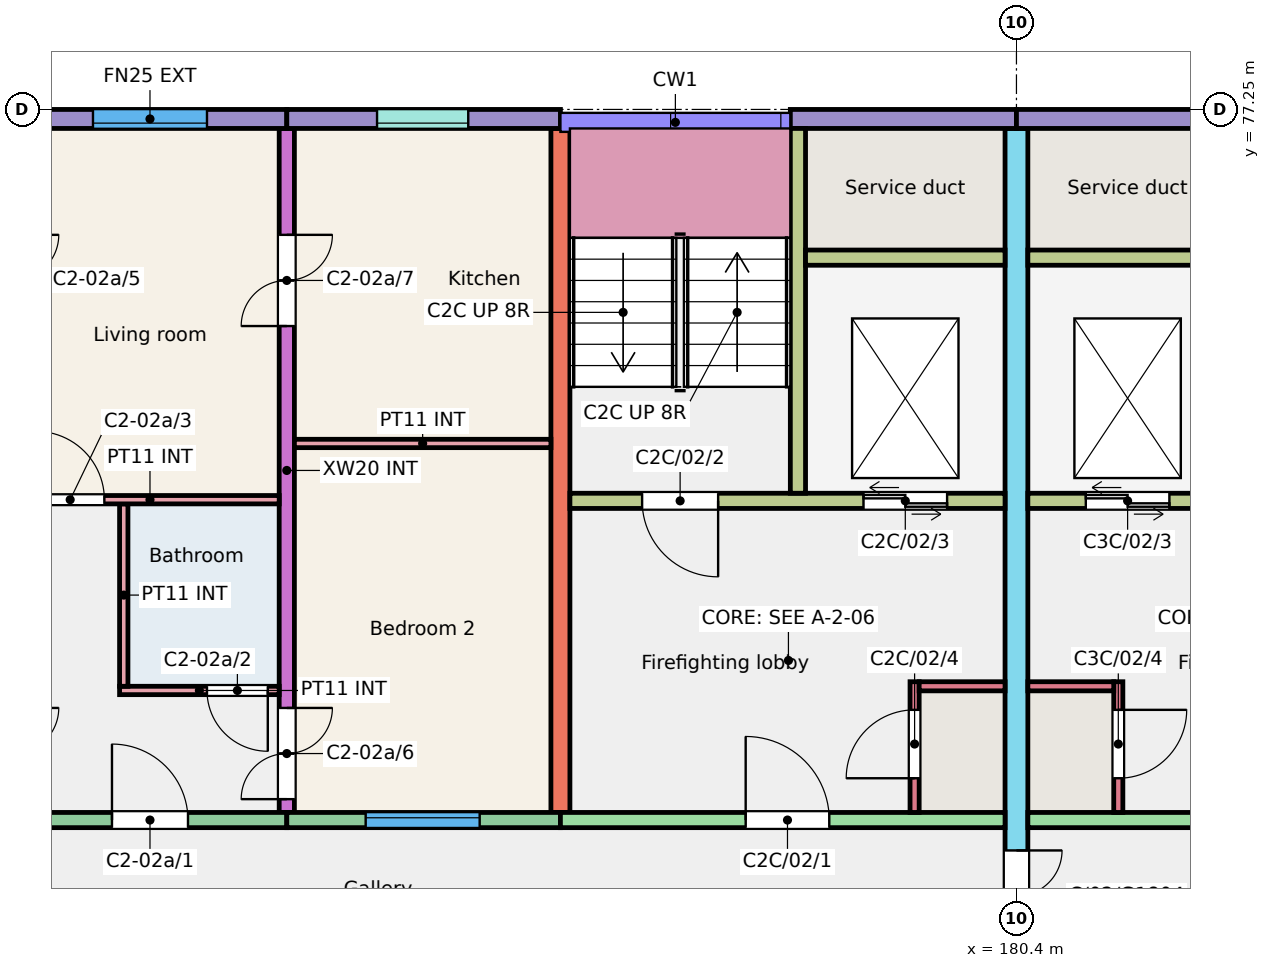
"""IFC4 building model, lengths in metres.
Left out: names, types, materials, properties, quantities, classifications, styles, units other than length and angle.
Written with IfcOpenShell. Run it as: python <this file> out.ifc"""

import sys

from ifc_helpers import new_model, si_unit, direction, frame, frame_2d, origin, place, context, subcontext, project, spatial, rectangle, extrude, element, fill, save


model = new_model("IFC4")
c1 = context("Model", 3, precision=1e-05, world=origin(), true_north=direction((0.0, 1.0)))
c2 = subcontext(c1, "Body", "Model", "MODEL_VIEW")
j1 = project(units=[si_unit("LENGTHUNIT", "METRE"), si_unit("PLANEANGLEUNIT", "RADIAN")], contexts=[c1])
p1 = place(None, origin())
s1 = spatial("IfcSite", under=j1, at=p1, CompositionType="ELEMENT")
p2 = place(p1, origin())
s2 = spatial("IfcBuilding", under=s1, at=p2, CompositionType="ELEMENT")
p3 = place(p2, frame((0.0, 0.0, 6.0)))
s3 = spatial("IfcBuildingStorey", under=s2, at=p3, CompositionType="ELEMENT", Elevation=6.0)
p4 = place(p3, frame((170.8, 68.0, 0.0), z_axis=(0.0, 0.0, 1.0), x_axis=(0.0, 1.0, 0.0)))
e1 = element("IfcWall", 1, at=p4, inside=s3, PredefinedType="SHEAR", context=c2, shape_type="SweptSolid", body=[
    extrude(rectangle(XDim=9.0, YDim=0.2, at=frame_2d((4.5, 0.0))), origin(), (0.0, 0.0, 1.0), 3.0),
])
p5 = place(p4, frame((0.175, 0.0, 0.0)))
e2 = element("IfcOpeningElement", 2, at=p5, cuts=e1, PredefinedType="OPENING", context=c2, shape_type="SweptSolid", body=[
    extrude(rectangle(XDim=1.2, YDim=2.1, at=frame_2d((0.6, 1.05))), frame((0.0, 0.11, 0.0), z_axis=(0.0, -1.0, 0.0), x_axis=(1.0, 0.0, 0.0)), (0.0, 0.0, 1.0), 0.22),
])
p6 = place(p4, frame((6.4, 0.0, 0.0)))
e3 = element("IfcOpeningElement", 3, at=p6, cuts=e1, PredefinedType="OPENING", context=c2, shape_type="SweptSolid", body=[
    extrude(rectangle(XDim=1.2, YDim=2.1, at=frame_2d((0.6, 1.05))), frame((0.0, 0.11, 0.0), z_axis=(0.0, -1.0, 0.0), x_axis=(1.0, 0.0, 0.0)), (0.0, 0.0, 1.0), 0.22),
])
p7 = place(p3, frame((174.4, 68.0, 0.0), z_axis=(0.0, 0.0, 1.0), x_axis=(0.0, 1.0, 0.0)))
e4 = element("IfcWall", 4, at=p7, inside=s3, PredefinedType="SHEAR", context=c2, shape_type="SweptSolid", body=[
    extrude(rectangle(XDim=9.0, YDim=0.25, at=frame_2d((4.5, 0.0))), origin(), (0.0, 0.0, 1.0), 3.0),
])
p8 = place(p3, frame((180.4, 66.0, 0.0), z_axis=(0.0, 0.0, 1.0), x_axis=(0.0, 1.0, 0.0)))
e5 = element("IfcWall", 5, at=p8, inside=s3, PredefinedType="SHEAR", context=c2, shape_type="SweptSolid", body=[
    extrude(rectangle(XDim=11.0, YDim=0.3, at=frame_2d((5.5, 0.0))), origin(), (0.0, 0.0, 1.0), 3.0),
])
p9 = place(p8, frame((0.3, 0.0, 0.0)))
e6 = element("IfcOpeningElement", 6, at=p9, cuts=e5, PredefinedType="OPENING", context=c2, shape_type="SweptSolid", body=[
    extrude(rectangle(XDim=1.2, YDim=2.1, at=frame_2d((0.6, 1.05))), frame((0.0, 0.16, 0.0), z_axis=(0.0, -1.0, 0.0), x_axis=(1.0, 0.0, 0.0)), (0.0, 0.0, 1.0), 0.32),
])
p10 = place(p3, frame((167.2, 77.125, 0.0), z_axis=(0.0, 0.0, 1.0), x_axis=(1.0, 0.0, 0.0)))
e7 = element("IfcWall", 7, at=p10, inside=s3, PredefinedType="SOLIDWALL", context=c2, shape_type="SweptSolid", body=[
    extrude(rectangle(XDim=3.6, YDim=0.25, at=frame_2d((1.8, 0.0))), origin(), (0.0, 0.0, 1.0), 3.0),
])
p11 = place(p10, frame((1.05, 0.0, 0.9)))
e8 = element("IfcOpeningElement", 8, at=p11, cuts=e7, PredefinedType="OPENING", context=c2, shape_type="SweptSolid", body=[
    extrude(rectangle(XDim=1.5, YDim=1.5, at=frame_2d((0.75, 0.75))), frame((0.0, 0.135, 0.0), z_axis=(0.0, -1.0, 0.0), x_axis=(1.0, 0.0, 0.0)), (0.0, 0.0, 1.0), 0.27),
])
p12 = place(p3, frame((167.2, 67.9, 0.0), z_axis=(0.0, 0.0, 1.0), x_axis=(1.0, 0.0, 0.0)))
e9 = element("IfcWall", 9, at=p12, inside=s3, PredefinedType="SOLIDWALL", context=c2, shape_type="SweptSolid", body=[
    extrude(rectangle(XDim=3.6, YDim=0.2, at=frame_2d((1.8, 0.0))), origin(), (0.0, 0.0, 1.0), 3.0),
])
p13 = place(p12, frame((1.3, 0.0, 0.0)))
e10 = element("IfcOpeningElement", 10, at=p13, cuts=e9, PredefinedType="OPENING", context=c2, shape_type="SweptSolid", body=[
    extrude(rectangle(XDim=1.0, YDim=2.1, at=frame_2d((0.5, 1.05))), frame((0.0, 0.11, 0.0), z_axis=(0.0, -1.0, 0.0), x_axis=(1.0, 0.0, 0.0)), (0.0, 0.0, 1.0), 0.22),
])
p14 = place(p3, frame((170.8, 77.125, 0.0), z_axis=(0.0, 0.0, 1.0), x_axis=(1.0, 0.0, 0.0)))
e11 = element("IfcWall", 11, at=p14, inside=s3, PredefinedType="SOLIDWALL", context=c2, shape_type="SweptSolid", body=[
    extrude(rectangle(XDim=3.6, YDim=0.25, at=frame_2d((1.8, 0.0))), origin(), (0.0, 0.0, 1.0), 3.0),
])
p15 = place(p14, frame((1.188, 0.0, 1.1)))
e12 = element("IfcOpeningElement", 12, at=p15, cuts=e11, PredefinedType="OPENING", context=c2, shape_type="SweptSolid", body=[
    extrude(rectangle(XDim=1.2, YDim=1.3, at=frame_2d((0.6, 0.65))), frame((0.0, 0.135, 0.0), z_axis=(0.0, -1.0, 0.0), x_axis=(1.0, 0.0, 0.0)), (0.0, 0.0, 1.0), 0.27),
])
p16 = place(p3, frame((170.8, 67.9, 0.0), z_axis=(0.0, 0.0, 1.0), x_axis=(1.0, 0.0, 0.0)))
e13 = element("IfcWall", 13, at=p16, inside=s3, PredefinedType="SOLIDWALL", context=c2, shape_type="SweptSolid", body=[
    extrude(rectangle(XDim=3.6, YDim=0.2, at=frame_2d((1.8, 0.0))), origin(), (0.0, 0.0, 1.0), 3.0),
])
p17 = place(p16, frame((1.038, 0.0, 0.9)))
e14 = element("IfcOpeningElement", 14, at=p17, cuts=e13, PredefinedType="OPENING", context=c2, shape_type="SweptSolid", body=[
    extrude(rectangle(XDim=1.5, YDim=1.5, at=frame_2d((0.75, 0.75))), frame((0.0, 0.11, 0.0), z_axis=(0.0, -1.0, 0.0), x_axis=(1.0, 0.0, 0.0)), (0.0, 0.0, 1.0), 0.22),
])
p18 = place(p3, frame((177.425, 77.125, 0.0), z_axis=(0.0, 0.0, 1.0), x_axis=(1.0, 0.0, 0.0)))
e15 = element("IfcWall", 15, at=p18, inside=s3, PredefinedType="SOLIDWALL", context=c2, shape_type="SweptSolid", body=[
    extrude(rectangle(XDim=2.975, YDim=0.25, at=frame_2d((1.487, 0.0))), origin(), (0.0, 0.0, 1.0), 3.0),
])
p19 = place(p3, frame((174.4, 67.9, 0.0), z_axis=(0.0, 0.0, 1.0), x_axis=(1.0, 0.0, 0.0)))
e16 = element("IfcWall", 16, at=p19, inside=s3, PredefinedType="SHEAR", context=c2, shape_type="SweptSolid", body=[
    extrude(rectangle(XDim=5.85, YDim=0.2, at=frame_2d((2.925, 0.0))), origin(), (0.0, 0.0, 1.0), 3.0),
])
p20 = place(p19, frame((2.438, 0.0, 0.0)))
e17 = element("IfcOpeningElement", 17, at=p20, cuts=e16, PredefinedType="OPENING", context=c2, shape_type="SweptSolid", body=[
    extrude(rectangle(XDim=1.1, YDim=2.1, at=frame_2d((0.55, 1.05))), frame((0.0, 0.11, 0.0), z_axis=(0.0, -1.0, 0.0), x_axis=(1.0, 0.0, 0.0)), (0.0, 0.0, 1.0), 0.22),
])
p21 = place(p3, frame((174.525, 72.1, 0.0), z_axis=(0.0, 0.0, 1.0), x_axis=(1.0, 0.0, 0.0)))
e18 = element("IfcWall", 18, at=p21, inside=s3, PredefinedType="SHEAR", context=c2, shape_type="SweptSolid", body=[
    extrude(rectangle(XDim=5.725, YDim=0.2, at=frame_2d((2.863, 0.0))), origin(), (0.0, 0.0, 1.0), 3.0),
])
p22 = place(p21, frame((0.95, 0.0, 0.0)))
e19 = element("IfcOpeningElement", 19, at=p22, cuts=e18, PredefinedType="OPENING", context=c2, shape_type="SweptSolid", body=[
    extrude(rectangle(XDim=1.0, YDim=2.1, at=frame_2d((0.5, 1.05))), frame((0.0, 0.11, 0.0), z_axis=(0.0, -1.0, 0.0), x_axis=(1.0, 0.0, 0.0)), (0.0, 0.0, 1.0), 0.22),
])
p23 = place(p21, frame((3.863, 0.0, 0.0)))
e20 = element("IfcOpeningElement", 20, at=p23, cuts=e18, PredefinedType="OPENING", context=c2, shape_type="SweptSolid", body=[
    extrude(rectangle(XDim=1.1, YDim=2.1, at=frame_2d((0.55, 1.05))), frame((0.0, 0.11, 0.0), z_axis=(0.0, -1.0, 0.0), x_axis=(1.0, 0.0, 0.0)), (0.0, 0.0, 1.0), 0.22),
])
p24 = place(p3, frame((177.525, 72.2, 0.0), z_axis=(0.0, 0.0, 1.0), x_axis=(0.0, 1.0, 0.0)))
e21 = element("IfcWall", 21, at=p24, inside=s3, PredefinedType="SHEAR", context=c2, shape_type="SweptSolid", body=[
    extrude(rectangle(XDim=4.8, YDim=0.2, at=frame_2d((2.4, 0.0))), origin(), (0.0, 0.0, 1.0), 3.0),
])
p25 = place(p3, frame((177.625, 75.3, 0.0), z_axis=(0.0, 0.0, 1.0), x_axis=(1.0, 0.0, 0.0)))
e22 = element("IfcWall", 22, at=p25, inside=s3, PredefinedType="SHEAR", context=c2, shape_type="SweptSolid", body=[
    extrude(rectangle(XDim=2.625, YDim=0.2, at=frame_2d((1.312, 0.0))), origin(), (0.0, 0.0, 1.0), 3.0),
])
p26 = place(p3, frame((179.06, 68.0, 0.0), z_axis=(0.0, 0.0, 1.0), x_axis=(0.0, 1.0, 0.0)))
e23 = element("IfcWall", 23, at=p26, inside=s3, PredefinedType="SHEAR", context=c2, shape_type="SweptSolid", body=[
    extrude(rectangle(XDim=1.72, YDim=0.12, at=frame_2d((0.86, 0.0))), origin(), (0.0, 0.0, 1.0), 3.0),
])
p27 = place(p26, frame((0.45, 0.0, 0.0)))
e24 = element("IfcOpeningElement", 24, at=p27, cuts=e23, PredefinedType="OPENING", context=c2, shape_type="SweptSolid", body=[
    extrude(rectangle(XDim=0.9, YDim=2.1, at=frame_2d((0.45, 1.05))), frame((0.0, 0.07, 0.0), z_axis=(0.0, -1.0, 0.0), x_axis=(1.0, 0.0, 0.0)), (0.0, 0.0, 1.0), 0.14),
])
p28 = place(p3, frame((179.12, 69.66, 0.0), z_axis=(0.0, 0.0, 1.0), x_axis=(1.0, 0.0, 0.0)))
e25 = element("IfcWall", 25, at=p28, inside=s3, PredefinedType="SHEAR", context=c2, shape_type="SweptSolid", body=[
    extrude(rectangle(XDim=1.13, YDim=0.12, at=frame_2d((0.565, 0.0))), origin(), (0.0, 0.0, 1.0), 3.0),
])
p29 = place(p3, frame((180.4, 77.125, 0.0), z_axis=(0.0, 0.0, 1.0), x_axis=(1.0, 0.0, 0.0)))
e26 = element("IfcWall", 26, at=p29, inside=s3, PredefinedType="SOLIDWALL", context=c2, shape_type="SweptSolid", body=[
    extrude(rectangle(XDim=2.975, YDim=0.25, at=frame_2d((1.488, 0.0))), origin(), (0.0, 0.0, 1.0), 3.0),
])
p30 = place(p3, frame((180.55, 67.9, 0.0), z_axis=(0.0, 0.0, 1.0), x_axis=(1.0, 0.0, 0.0)))
e27 = element("IfcWall", 27, at=p30, inside=s3, PredefinedType="SHEAR", context=c2, shape_type="SweptSolid", body=[
    extrude(rectangle(XDim=5.85, YDim=0.2, at=frame_2d((2.925, 0.0))), origin(), (0.0, 0.0, 1.0), 3.0),
])
p31 = place(p30, frame((2.312, 0.0, 0.0)))
e28 = element("IfcOpeningElement", 28, at=p31, cuts=e27, PredefinedType="OPENING", context=c2, shape_type="SweptSolid", body=[
    extrude(rectangle(XDim=1.1, YDim=2.1, at=frame_2d((0.55, 1.05))), frame((0.0, 0.11, 0.0), z_axis=(0.0, -1.0, 0.0), x_axis=(1.0, 0.0, 0.0)), (0.0, 0.0, 1.0), 0.22),
])
p32 = place(p3, frame((180.55, 72.1, 0.0), z_axis=(0.0, 0.0, 1.0), x_axis=(1.0, 0.0, 0.0)))
e29 = element("IfcWall", 29, at=p32, inside=s3, PredefinedType="SHEAR", context=c2, shape_type="SweptSolid", body=[
    extrude(rectangle(XDim=5.725, YDim=0.2, at=frame_2d((2.862, 0.0))), origin(), (0.0, 0.0, 1.0), 3.0),
])
p33 = place(p32, frame((3.775, 0.0, 0.0)))
e30 = element("IfcOpeningElement", 30, at=p33, cuts=e29, PredefinedType="OPENING", context=c2, shape_type="SweptSolid", body=[
    extrude(rectangle(XDim=1.0, YDim=2.1, at=frame_2d((0.5, 1.05))), frame((0.0, 0.11, 0.0), z_axis=(0.0, -1.0, 0.0), x_axis=(1.0, 0.0, 0.0)), (0.0, 0.0, 1.0), 0.22),
])
p34 = place(p32, frame((0.762, 0.0, 0.0)))
e31 = element("IfcOpeningElement", 31, at=p34, cuts=e29, PredefinedType="OPENING", context=c2, shape_type="SweptSolid", body=[
    extrude(rectangle(XDim=1.1, YDim=2.1, at=frame_2d((0.55, 1.05))), frame((0.0, 0.11, 0.0), z_axis=(0.0, -1.0, 0.0), x_axis=(1.0, 0.0, 0.0)), (0.0, 0.0, 1.0), 0.22),
])
p35 = place(p3, frame((180.55, 75.3, 0.0), z_axis=(0.0, 0.0, 1.0), x_axis=(1.0, 0.0, 0.0)))
e32 = element("IfcWall", 32, at=p35, inside=s3, PredefinedType="SHEAR", context=c2, shape_type="SweptSolid", body=[
    extrude(rectangle(XDim=2.625, YDim=0.2, at=frame_2d((1.312, 0.0))), origin(), (0.0, 0.0, 1.0), 3.0),
])
p36 = place(p3, frame((181.74, 68.0, 0.0), z_axis=(0.0, 0.0, 1.0), x_axis=(0.0, 1.0, 0.0)))
e33 = element("IfcWall", 33, at=p36, inside=s3, PredefinedType="SHEAR", context=c2, shape_type="SweptSolid", body=[
    extrude(rectangle(XDim=1.72, YDim=0.12, at=frame_2d((0.86, 0.0))), origin(), (0.0, 0.0, 1.0), 3.0),
])
p37 = place(p36, frame((0.45, 0.0, 0.0)))
e34 = element("IfcOpeningElement", 34, at=p37, cuts=e33, PredefinedType="OPENING", context=c2, shape_type="SweptSolid", body=[
    extrude(rectangle(XDim=0.9, YDim=2.1, at=frame_2d((0.45, 1.05))), frame((0.0, 0.07, 0.0), z_axis=(0.0, -1.0, 0.0), x_axis=(1.0, 0.0, 0.0)), (0.0, 0.0, 1.0), 0.14),
])
p38 = place(p3, frame((180.55, 69.66, 0.0), z_axis=(0.0, 0.0, 1.0), x_axis=(1.0, 0.0, 0.0)))
e35 = element("IfcWall", 35, at=p38, inside=s3, PredefinedType="SHEAR", context=c2, shape_type="SweptSolid", body=[
    extrude(rectangle(XDim=1.13, YDim=0.12, at=frame_2d((0.565, 0.0))), origin(), (0.0, 0.0, 1.0), 3.0),
])
p39 = place(p3, frame((168.6, 69.605, 0.0), z_axis=(0.0, 0.0, 1.0), x_axis=(1.0, 0.0, 0.0)))
e36 = element("IfcWall", 36, at=p39, inside=s3, PredefinedType="PARTITIONING", context=c2, shape_type="SweptSolid", body=[
    extrude(rectangle(XDim=2.1, YDim=0.11, at=frame_2d((1.05, 0.0))), origin(), (0.0, 0.0, 1.0), 2.8),
])
p40 = place(p39, frame((1.15, 0.0, 0.0)))
e37 = element("IfcOpeningElement", 37, at=p40, cuts=e36, PredefinedType="OPENING", context=c2, shape_type="SweptSolid", body=[
    extrude(rectangle(XDim=0.8, YDim=2.1, at=frame_2d((0.4, 1.05))), frame((0.0, 0.065, 0.0), z_axis=(0.0, -1.0, 0.0), x_axis=(1.0, 0.0, 0.0)), (0.0, 0.0, 1.0), 0.13),
])
p41 = place(p3, frame((168.655, 69.66, 0.0), z_axis=(0.0, 0.0, 1.0), x_axis=(0.0, 1.0, 0.0)))
e38 = element("IfcWall", 38, at=p41, inside=s3, PredefinedType="PARTITIONING", context=c2, shape_type="SweptSolid", body=[
    extrude(rectangle(XDim=2.4, YDim=0.11, at=frame_2d((1.2, 0.0))), origin(), (0.0, 0.0, 1.0), 2.8),
])
p42 = place(p3, frame((167.3, 72.115, 0.0), z_axis=(0.0, 0.0, 1.0), x_axis=(1.0, 0.0, 0.0)))
e39 = element("IfcWall", 39, at=p42, inside=s3, PredefinedType="PARTITIONING", context=c2, shape_type="SweptSolid", body=[
    extrude(rectangle(XDim=3.4, YDim=0.11, at=frame_2d((1.7, 0.0))), origin(), (0.0, 0.0, 1.0), 2.8),
])
p43 = place(p42, frame((0.2, 0.0, 0.0)))
e40 = element("IfcOpeningElement", 40, at=p43, cuts=e39, PredefinedType="OPENING", context=c2, shape_type="SweptSolid", body=[
    extrude(rectangle(XDim=0.9, YDim=2.1, at=frame_2d((0.45, 1.05))), frame((0.0, 0.065, 0.0), z_axis=(0.0, -1.0, 0.0), x_axis=(1.0, 0.0, 0.0)), (0.0, 0.0, 1.0), 0.13),
])
p44 = place(p3, frame((170.9, 72.855, 0.0), z_axis=(0.0, 0.0, 1.0), x_axis=(1.0, 0.0, 0.0)))
e41 = element("IfcWall", 41, at=p44, inside=s3, PredefinedType="PARTITIONING", context=c2, shape_type="SweptSolid", body=[
    extrude(rectangle(XDim=3.375, YDim=0.11, at=frame_2d((1.688, 0.0))), origin(), (0.0, 0.0, 1.0), 2.8),
])
p45 = place(p17, origin())
e42 = element("IfcWindow", 42, at=p45, inside=s3, PartitioningType="SINGLE_PANEL", PredefinedType="WINDOW", context=c2, shape_type="SweptSolid", body=[
    extrude(rectangle(XDim=1.5, YDim=1.5, at=frame_2d((0.75, 0.75))), frame((0.0, 0.06, 0.0), z_axis=(0.0, -1.0, 0.0), x_axis=(1.0, 0.0, 0.0)), (0.0, 0.0, 1.0), 0.06),
])
fill(e14, e42)
p46 = place(p15, origin())
e43 = element("IfcWindow", 43, at=p46, inside=s3, PartitioningType="SINGLE_PANEL", PredefinedType="WINDOW", context=c2, shape_type="SweptSolid", body=[
    extrude(rectangle(XDim=1.2, YDim=1.3, at=frame_2d((0.6, 0.65))), frame((0.0, -0.025, 0.0), z_axis=(0.0, -1.0, 0.0), x_axis=(1.0, 0.0, 0.0)), (0.0, 0.0, 1.0), 0.06),
])
fill(e12, e43)
p47 = place(p11, origin())
e44 = element("IfcWindow", 44, at=p47, inside=s3, PartitioningType="SINGLE_PANEL", PredefinedType="WINDOW", context=c2, shape_type="SweptSolid", body=[
    extrude(rectangle(XDim=1.5, YDim=1.5, at=frame_2d((0.75, 0.75))), frame((0.0, -0.025, 0.0), z_axis=(0.0, -1.0, 0.0), x_axis=(1.0, 0.0, 0.0)), (0.0, 0.0, 1.0), 0.06),
])
fill(e8, e44)
p48 = place(p13, origin())
e45 = element("IfcDoor", 45, at=p48, inside=s3, OperationType="SINGLE_SWING_LEFT", PredefinedType="DOOR", context=c2, shape_type="SweptSolid", body=[
    extrude(rectangle(XDim=1.0, YDim=2.1, at=frame_2d((0.5, 1.05))), frame((0.0, 0.025, 0.0), z_axis=(0.0, -1.0, 0.0), x_axis=(1.0, 0.0, 0.0)), (0.0, 0.0, 1.0), 0.05),
])
fill(e10, e45)
p49 = place(p40, origin())
e46 = element("IfcDoor", 46, at=p49, inside=s3, OperationType="SINGLE_SWING_RIGHT", PredefinedType="DOOR", context=c2, shape_type="SweptSolid", body=[
    extrude(rectangle(XDim=0.8, YDim=2.1, at=frame_2d((0.4, 1.05))), frame((0.0, 0.025, 0.0), z_axis=(0.0, -1.0, 0.0), x_axis=(1.0, 0.0, 0.0)), (0.0, 0.0, 1.0), 0.05),
])
fill(e37, e46)
p50 = place(p43, origin())
e47 = element("IfcDoor", 47, at=p50, inside=s3, OperationType="SINGLE_SWING_LEFT", PredefinedType="DOOR", context=c2, shape_type="SweptSolid", body=[
    extrude(rectangle(XDim=0.9, YDim=2.1, at=frame_2d((0.45, 1.05))), frame((0.0, 0.025, 0.0), z_axis=(0.0, -1.0, 0.0), x_axis=(1.0, 0.0, 0.0)), (0.0, 0.0, 1.0), 0.05),
])
fill(e40, e47)
p51 = place(p5, origin())
e48 = element("IfcDoor", 48, at=p51, inside=s3, OperationType="DOUBLE_DOOR_SINGLE_SWING", PredefinedType="DOOR", context=c2, shape_type="SweptSolid", body=[
    extrude(rectangle(XDim=1.2, YDim=2.1, at=frame_2d((0.6, 1.05))), frame((0.0, 0.025, 0.0), z_axis=(0.0, -1.0, 0.0), x_axis=(1.0, 0.0, 0.0)), (0.0, 0.0, 1.0), 0.05),
])
fill(e2, e48)
p52 = place(p6, origin())
e49 = element("IfcDoor", 49, at=p52, inside=s3, OperationType="DOUBLE_DOOR_SINGLE_SWING", PredefinedType="DOOR", context=c2, shape_type="SweptSolid", body=[
    extrude(rectangle(XDim=1.2, YDim=2.1, at=frame_2d((0.6, 1.05))), frame((0.0, 0.025, 0.0), z_axis=(0.0, -1.0, 0.0), x_axis=(1.0, 0.0, 0.0)), (0.0, 0.0, 1.0), 0.05),
])
fill(e3, e49)
p53 = place(p20, origin())
e50 = element("IfcDoor", 50, at=p53, inside=s3, OperationType="SINGLE_SWING_LEFT", PredefinedType="DOOR", context=c2, shape_type="SweptSolid", body=[
    extrude(rectangle(XDim=1.1, YDim=2.1, at=frame_2d((0.55, 1.05))), frame((0.0, 0.025, 0.0), z_axis=(0.0, -1.0, 0.0), x_axis=(1.0, 0.0, 0.0)), (0.0, 0.0, 1.0), 0.05),
])
fill(e17, e50)
p54 = place(p22, origin())
e51 = element("IfcDoor", 51, at=p54, inside=s3, OperationType="SINGLE_SWING_RIGHT", PredefinedType="DOOR", context=c2, shape_type="SweptSolid", body=[
    extrude(rectangle(XDim=1.0, YDim=2.1, at=frame_2d((0.5, 1.05))), frame((0.0, 0.025, 0.0), z_axis=(0.0, -1.0, 0.0), x_axis=(1.0, 0.0, 0.0)), (0.0, 0.0, 1.0), 0.05),
])
fill(e19, e51)
p55 = place(p23, origin())
e52 = element("IfcDoor", 52, at=p55, inside=s3, OperationType="DOUBLE_DOOR_SLIDING", PredefinedType="DOOR", context=c2, shape_type="SweptSolid", body=[
    extrude(rectangle(XDim=1.1, YDim=2.1, at=frame_2d((0.55, 1.05))), frame((0.0, 0.025, 0.0), z_axis=(0.0, -1.0, 0.0), x_axis=(1.0, 0.0, 0.0)), (0.0, 0.0, 1.0), 0.05),
])
fill(e20, e52)
p56 = place(p27, origin())
e53 = element("IfcDoor", 53, at=p56, inside=s3, OperationType="SINGLE_SWING_LEFT", PredefinedType="DOOR", context=c2, shape_type="SweptSolid", body=[
    extrude(rectangle(XDim=0.9, YDim=2.1, at=frame_2d((0.45, 1.05))), frame((0.0, 0.025, 0.0), z_axis=(0.0, -1.0, 0.0), x_axis=(1.0, 0.0, 0.0)), (0.0, 0.0, 1.0), 0.05),
])
fill(e24, e53)
p57 = place(p34, origin())
e54 = element("IfcDoor", 54, at=p57, inside=s3, OperationType="DOUBLE_DOOR_SLIDING", PredefinedType="DOOR", context=c2, shape_type="SweptSolid", body=[
    extrude(rectangle(XDim=1.1, YDim=2.1, at=frame_2d((0.55, 1.05))), frame((0.0, 0.025, 0.0), z_axis=(0.0, -1.0, 0.0), x_axis=(1.0, 0.0, 0.0)), (0.0, 0.0, 1.0), 0.05),
])
fill(e31, e54)
p58 = place(p37, origin())
e55 = element("IfcDoor", 55, at=p58, inside=s3, OperationType="SINGLE_SWING_RIGHT", PredefinedType="DOOR", context=c2, shape_type="SweptSolid", body=[
    extrude(rectangle(XDim=0.9, YDim=2.1, at=frame_2d((0.45, 1.05))), frame((0.0, 0.025, 0.0), z_axis=(0.0, -1.0, 0.0), x_axis=(1.0, 0.0, 0.0)), (0.0, 0.0, 1.0), 0.05),
])
fill(e34, e55)
p59 = place(p9, origin())
e56 = element("IfcDoor", 56, at=p59, inside=s3, OperationType="DOUBLE_DOOR_SINGLE_SWING", PredefinedType="DOOR", context=c2, shape_type="SweptSolid", body=[
    extrude(rectangle(XDim=1.2, YDim=2.1, at=frame_2d((0.6, 1.05))), frame((0.0, 0.025, 0.0), z_axis=(0.0, -1.0, 0.0), x_axis=(1.0, 0.0, 0.0)), (0.0, 0.0, 1.0), 0.05),
])
fill(e6, e56)
save(model, sys.argv[1])
